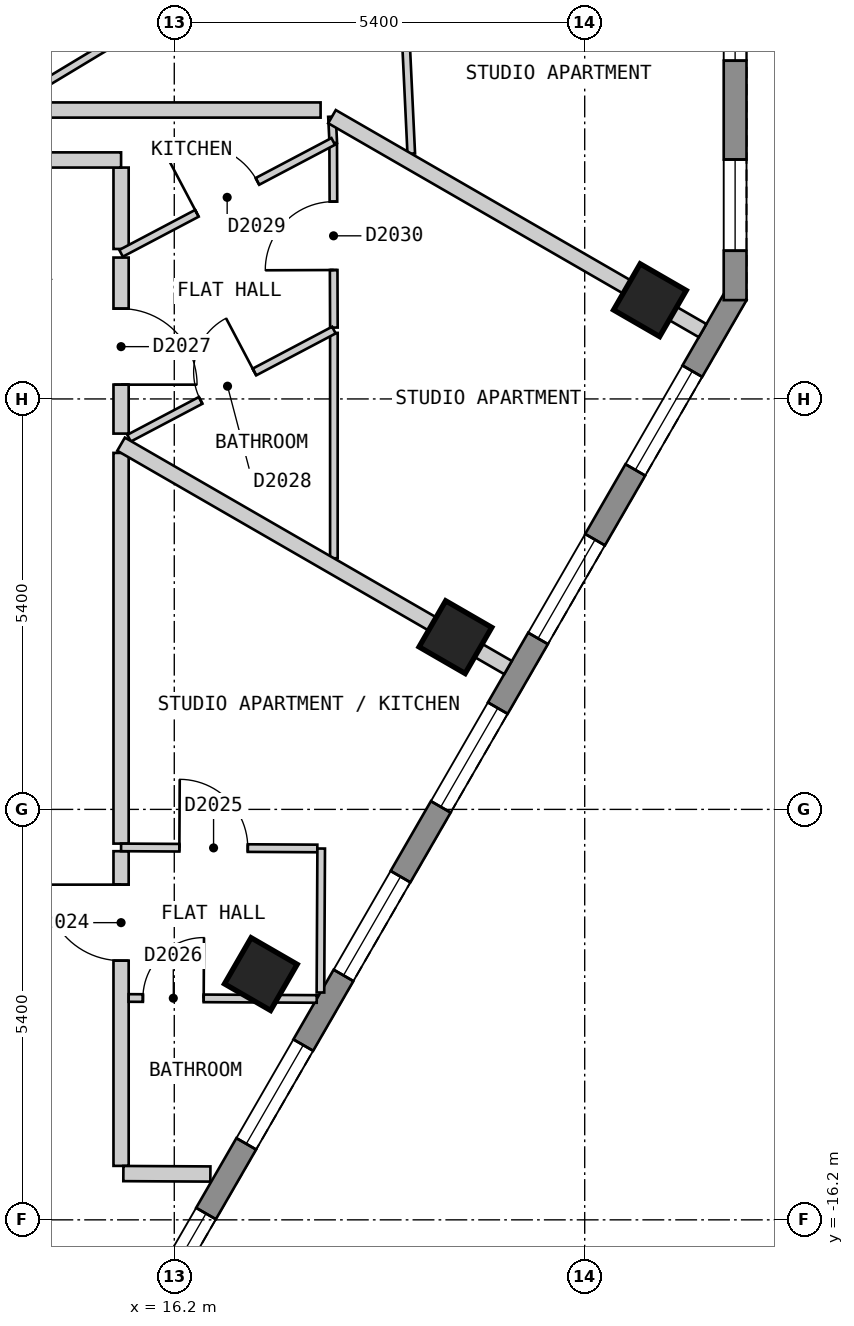
"""IFC4 building model, lengths in metres.
Left out: names, types, materials, properties, quantities, classifications, styles, units other than length and angle.
Written with IfcOpenShell. Run it as: python <this file> out.ifc"""

import sys

from ifc_helpers import new_model, si_unit, direction, frame, frame_2d, origin, origin_2d, place, context, subcontext, project, spatial, polyline, rectangle, outline, extrude, element, fill, save


model = new_model("IFC4")
c1 = context("Model", 3, precision=1e-05, world=origin(), true_north=direction((0.0, 1.0)))
c2 = subcontext(c1, "Body", "Model", "MODEL_VIEW")
j1 = project(units=[si_unit("LENGTHUNIT", "METRE"), si_unit("PLANEANGLEUNIT", "RADIAN")], contexts=[c1])
p1 = place(None, origin())
s1 = spatial("IfcSite", under=j1, at=p1, CompositionType="ELEMENT")
p2 = place(p1, origin())
s2 = spatial("IfcBuilding", under=s1, at=p2, CompositionType="ELEMENT")
p3 = place(p2, frame((0.0, 0.0, 238.8)))
s3 = spatial("IfcBuildingStorey", under=s2, at=p3, CompositionType="ELEMENT", Elevation=238.8)
for number, where, z_axis, x_axis in (
    (1, (17.339, -12.967, 0.0), (0.0, 0.0, 1.0), (0.5, 0.866, 0.0)),
    (2, (19.899, -8.534, 0.0), (0.0, 0.0, 1.0), (0.5, 0.866, 0.0)),
    (3, (22.458, -4.101, 0.0), (0.0, 0.0, 1.0), (0.5, 0.866, 0.0)),
):
    element("IfcColumn", number, at=place(p3, frame(where, z_axis=z_axis, x_axis=x_axis)), inside=s3, PredefinedType="COLUMN", context=c2, shape_type="SweptSolid", body=[
        extrude(rectangle(XDim=0.7, YDim=0.7, at=origin_2d()), origin(), (0.0, 0.0, 1.0), 3.0),
    ])
p4 = place(p3, frame((15.285, -18.425, 0.0), z_axis=(0.0, 0.0, 1.0), x_axis=(0.500012653391, 0.866018098222, 0.0)))
e4 = element("IfcWall", 4, at=p4, inside=s3, PredefinedType="SOLIDWALL", context=c2, shape_type="SweptSolid", body=[
    extrude(outline(polyline([(0.0, -0.15), (16.628, -0.15), (16.548, 0.15), (0.08, 0.15), (0.0, -0.15)])), origin(), (0.0, 0.0, 1.0), 2.7),
])
p5 = place(p4, frame((1.165, 0.0, 0.15)))
e5 = element("IfcOpeningElement", 5, at=p5, cuts=e4, PredefinedType="OPENING", context=c2, shape_type="SweptSolid", body=[
    extrude(rectangle(XDim=1.5, YDim=2.1, at=frame_2d((0.75, 1.05))), frame((0.0, 0.16, 0.0), z_axis=(0.0, -1.0, 0.0), x_axis=(1.0, 0.0, 0.0)), (0.0, 0.0, 1.0), 0.32),
])
p6 = place(p4, frame((3.724, 0.0, 0.15)))
e6 = element("IfcOpeningElement", 6, at=p6, cuts=e4, PredefinedType="OPENING", context=c2, shape_type="SweptSolid", body=[
    extrude(rectangle(XDim=1.5, YDim=2.1, at=frame_2d((0.75, 1.05))), frame((0.0, 0.16, 0.0), z_axis=(0.0, -1.0, 0.0), x_axis=(1.0, 0.0, 0.0)), (0.0, 0.0, 1.0), 0.32),
])
p7 = place(p4, frame((6.283, 0.0, 0.15)))
e7 = element("IfcOpeningElement", 7, at=p7, cuts=e4, PredefinedType="OPENING", context=c2, shape_type="SweptSolid", body=[
    extrude(rectangle(XDim=1.5, YDim=2.1, at=frame_2d((0.75, 1.05))), frame((0.0, 0.16, 0.0), z_axis=(0.0, -1.0, 0.0), x_axis=(1.0, 0.0, 0.0)), (0.0, 0.0, 1.0), 0.32),
])
p8 = place(p4, frame((8.843, 0.0, 0.15)))
e8 = element("IfcOpeningElement", 8, at=p8, cuts=e4, PredefinedType="OPENING", context=c2, shape_type="SweptSolid", body=[
    extrude(rectangle(XDim=1.5, YDim=2.1, at=frame_2d((0.75, 1.05))), frame((0.0, 0.16, 0.0), z_axis=(0.0, -1.0, 0.0), x_axis=(1.0, 0.0, 0.0)), (0.0, 0.0, 1.0), 0.32),
])
p9 = place(p4, frame((11.402, 0.0, 0.15)))
e9 = element("IfcOpeningElement", 9, at=p9, cuts=e4, PredefinedType="OPENING", context=c2, shape_type="SweptSolid", body=[
    extrude(rectangle(XDim=1.5, YDim=2.1, at=frame_2d((0.75, 1.05))), frame((0.0, 0.16, 0.0), z_axis=(0.0, -1.0, 0.0), x_axis=(1.0, 0.0, 0.0)), (0.0, 0.0, 1.0), 0.32),
])
p10 = place(p4, frame((13.962, 0.0, 0.15)))
e10 = element("IfcOpeningElement", 10, at=p10, cuts=e4, PredefinedType="OPENING", context=c2, shape_type="SweptSolid", body=[
    extrude(rectangle(XDim=1.5, YDim=2.1, at=frame_2d((0.75, 1.05))), frame((0.0, 0.16, 0.0), z_axis=(0.0, -1.0, 0.0), x_axis=(1.0, 0.0, 0.0)), (0.0, 0.0, 1.0), 0.32),
])
p11 = place(p3, frame((23.579, -4.1, 0.0), z_axis=(0.0, 0.0, 1.0), x_axis=(0.0, 1.0, 0.0)))
e11 = element("IfcWall", 11, at=p11, inside=s3, PredefinedType="SOLIDWALL", context=c2, shape_type="SweptSolid", body=[
    extrude(outline(polyline([(0.0, -0.15), (5.0, -0.15), (4.92, 0.15), (0.08, 0.15), (0.0, -0.15)])), origin(), (0.0, 0.0, 1.0), 2.7),
])
p12 = place(p11, frame((0.65, 0.0, 0.15)))
e12 = element("IfcOpeningElement", 12, at=p12, cuts=e11, PredefinedType="OPENING", context=c2, shape_type="SweptSolid", body=[
    extrude(rectangle(XDim=1.2, YDim=2.1, at=frame_2d((0.6, 1.05))), frame((0.0, 0.16, 0.0), z_axis=(0.0, -1.0, 0.0), x_axis=(1.0, 0.0, 0.0)), (0.0, 0.0, 1.0), 0.32),
])
p13 = place(p11, frame((3.15, 0.0, 0.15)))
e13 = element("IfcOpeningElement", 13, at=p13, cuts=e11, PredefinedType="OPENING", context=c2, shape_type="SweptSolid", body=[
    extrude(rectangle(XDim=1.2, YDim=2.1, at=frame_2d((0.6, 1.05))), frame((0.0, 0.16, 0.0), z_axis=(0.0, -1.0, 0.0), x_axis=(1.0, 0.0, 0.0)), (0.0, 0.0, 1.0), 0.32),
])
p14 = place(p3, frame((15.5, -2.356, 0.0), z_axis=(0.0, 0.0, 1.0), x_axis=(0.0, -1.0, 0.0)))
e14 = element("IfcWall", 14, at=p14, inside=s3, PredefinedType="PARTITIONING", context=c2, shape_type="SweptSolid", body=[
    extrude(rectangle(XDim=1.071, YDim=0.2, at=frame_2d((0.536, 0.0))), origin(), (0.0, 0.0, 1.0), 2.7),
])
p15 = place(p3, frame((15.5, -6.11, 0.0), z_axis=(0.0, 0.0, 1.0), x_axis=(0.0, -1.0, 0.0)))
e15 = element("IfcWall", 15, at=p15, inside=s3, PredefinedType="PARTITIONING", context=c2, shape_type="SweptSolid", body=[
    extrude(rectangle(XDim=5.14, YDim=0.2, at=frame_2d((2.57, 0.0))), origin(), (0.0, 0.0, 1.0), 2.7),
])
p16 = place(p3, frame((12.902, -2.256, 0.0), z_axis=(0.0, 0.0, 1.0), x_axis=(1.0, 0.0, 0.0)))
e16 = element("IfcWall", 16, at=p16, inside=s3, PredefinedType="PARTITIONING", context=c2, shape_type="SweptSolid", body=[
    extrude(rectangle(XDim=2.598, YDim=0.2, at=frame_2d((1.299, 0.0))), origin(), (0.0, 0.0, 1.0), 2.7),
])
p17 = place(p3, frame((15.5, -15.49, 0.0), z_axis=(0.0, 0.0, 1.0), x_axis=(0.0, 1.0, 0.0)))
e17 = element("IfcWall", 17, at=p17, inside=s3, PredefinedType="PARTITIONING", context=c2, shape_type="SweptSolid", body=[
    extrude(rectangle(XDim=4.14, YDim=0.2, at=frame_2d((2.07, 0.0))), origin(), (0.0, 0.0, 1.0), 2.7),
])
p18 = place(p17, frame((2.7, 0.0, 0.0)))
e18 = element("IfcOpeningElement", 18, at=p18, cuts=e17, PredefinedType="OPENING", context=c2, shape_type="SweptSolid", body=[
    extrude(rectangle(XDim=1.0, YDim=2.1, at=frame_2d((0.5, 1.05))), frame((0.0, 0.11, 0.0), z_axis=(0.0, -1.0, 0.0), x_axis=(1.0, 0.0, 0.0)), (0.0, 0.0, 1.0), 0.22),
])
p19 = place(p3, frame((15.5, -5.856, 0.0), z_axis=(0.0, 0.0, 1.0), x_axis=(0.0, 1.0, 0.0)))
e19 = element("IfcWall", 19, at=p19, inside=s3, PredefinedType="PARTITIONING", context=c2, shape_type="SweptSolid", body=[
    extrude(rectangle(XDim=2.316, YDim=0.2, at=frame_2d((1.158, 0.0))), origin(), (0.0, 0.0, 1.0), 2.7),
])
p20 = place(p19, frame((0.644, 0.0, 0.0)))
e20 = element("IfcOpeningElement", 20, at=p20, cuts=e19, PredefinedType="OPENING", context=c2, shape_type="SweptSolid", body=[
    extrude(rectangle(XDim=1.0, YDim=2.1, at=frame_2d((0.5, 1.05))), frame((0.0, 0.11, 0.0), z_axis=(0.0, -1.0, 0.0), x_axis=(1.0, 0.0, 0.0)), (0.0, 0.0, 1.0), 0.22),
])
p21 = place(p3, frame((15.5, -11.3, 0.0), z_axis=(0.0, 0.0, 1.0), x_axis=(0.999985476631, -0.005389482996, 0.0)))
e21 = element("IfcWall", 21, at=p21, inside=s3, PredefinedType="PARTITIONING", context=c2, shape_type="SweptSolid", body=[
    extrude(rectangle(XDim=2.582, YDim=0.1, at=frame_2d((1.291, 0.0))), origin(), (0.0, 0.0, 1.0), 2.7),
])
p22 = place(p21, frame((0.767, 0.0, 0.0)))
e22 = element("IfcOpeningElement", 22, at=p22, cuts=e21, PredefinedType="OPENING", context=c2, shape_type="SweptSolid", body=[
    extrude(rectangle(XDim=0.9, YDim=2.1, at=frame_2d((0.45, 1.05))), frame((0.0, 0.06, 0.0), z_axis=(0.0, -1.0, 0.0), x_axis=(1.0, 0.0, 0.0)), (0.0, 0.0, 1.0), 0.12),
])
p23 = place(p3, frame((15.6, -13.281, 0.0), z_axis=(0.0, 0.0, 1.0), x_axis=(0.999986321554, -0.005230363667, 0.0)))
e23 = element("IfcWall", 23, at=p23, inside=s3, PredefinedType="PARTITIONING", context=c2, shape_type="SweptSolid", body=[
    extrude(rectangle(XDim=2.474, YDim=0.1, at=frame_2d((1.237, 0.0))), origin(), (0.0, 0.0, 1.0), 2.7),
])
p24 = place(p23, frame((0.187, 0.0, 0.0)))
e24 = element("IfcOpeningElement", 24, at=p24, cuts=e23, PredefinedType="OPENING", context=c2, shape_type="SweptSolid", body=[
    extrude(rectangle(XDim=0.8, YDim=2.1, at=frame_2d((0.4, 1.05))), frame((0.0, 0.06, 0.0), z_axis=(0.0, -1.0, 0.0), x_axis=(1.0, 0.0, 0.0)), (0.0, 0.0, 1.0), 0.12),
])
p25 = place(p3, frame((18.275, -1.686, 0.0), z_axis=(0.0, 0.0, 1.0), x_axis=(0.049063646166, -0.998795654088, 0.0)))
e25 = element("IfcWall", 25, at=p25, inside=s3, PredefinedType="PARTITIONING", context=c2, shape_type="SweptSolid", body=[
    extrude(rectangle(XDim=0.348, YDim=0.1, at=frame_2d((0.174, 0.0))), origin(), (0.0, 0.0, 1.0), 2.7),
])
p26 = place(p3, frame((19.151, 1.343, 0.0), z_axis=(0.0, 0.0, 1.0), x_axis=(0.047509130714, -0.998870803707, 0.0)))
e26 = element("IfcWall", 26, at=p26, inside=s3, PredefinedType="PARTITIONING", context=c2, shape_type="SweptSolid", body=[
    extrude(rectangle(XDim=3.52, YDim=0.1, at=frame_2d((1.76, 0.0))), origin(), (0.0, 0.0, 1.0), 2.7),
])
p27 = place(p3, frame((18.291, -2.048, 0.0), z_axis=(0.0, 0.0, 1.0), x_axis=(0.003743776253, -0.999992992045, 0.0)))
e27 = element("IfcWall", 27, at=p27, inside=s3, PredefinedType="PARTITIONING", context=c2, shape_type="SweptSolid", body=[
    extrude(rectangle(XDim=2.413, YDim=0.1, at=frame_2d((1.207, 0.0))), origin(), (0.0, 0.0, 1.0), 2.7),
])
p28 = place(p27, frame((0.756, 0.0, 0.0)))
e28 = element("IfcOpeningElement", 28, at=p28, cuts=e27, PredefinedType="OPENING", context=c2, shape_type="SweptSolid", body=[
    extrude(rectangle(XDim=0.9, YDim=2.1, at=frame_2d((0.45, 1.05))), frame((0.0, 0.06, 0.0), z_axis=(0.0, -1.0, 0.0), x_axis=(1.0, 0.0, 0.0)), (0.0, 0.0, 1.0), 0.12),
])
p29 = place(p3, frame((18.123, -13.209, 0.0), z_axis=(0.0, 0.0, 1.0), x_axis=(0.005284793433, 0.999986035382, 0.0)))
e29 = element("IfcWall", 29, at=p29, inside=s3, PredefinedType="PARTITIONING", context=c2, shape_type="SweptSolid", body=[
    extrude(rectangle(XDim=1.894, YDim=0.1, at=frame_2d((0.947, 0.0))), origin(), (0.0, 0.0, 1.0), 2.7),
])
p30 = place(p3, frame((18.3, -7.496, 0.0), z_axis=(0.0, 0.0, 1.0), x_axis=(0.0, 1.0, 0.0)))
e30 = element("IfcWall", 30, at=p30, inside=s3, PredefinedType="PARTITIONING", context=c2, shape_type="SweptSolid", body=[
    extrude(rectangle(XDim=2.965, YDim=0.1, at=frame_2d((1.482, 0.0))), origin(), (0.0, 0.0, 1.0), 2.7),
])
p31 = place(p3, frame((15.5, -3.484, 0.0), z_axis=(0.0, 0.0, 1.0), x_axis=(0.884530210683, 0.466482911145, 0.0)))
e31 = element("IfcWall", 31, at=p31, inside=s3, PredefinedType="PARTITIONING", context=c2, shape_type="SweptSolid", body=[
    extrude(rectangle(XDim=3.155, YDim=0.1, at=frame_2d((1.578, 0.0))), origin(), (0.0, 0.0, 1.0), 2.7),
])
p32 = place(p31, frame((1.128, 0.0, 0.0)))
e32 = element("IfcOpeningElement", 32, at=p32, cuts=e31, PredefinedType="OPENING", context=c2, shape_type="SweptSolid", body=[
    extrude(rectangle(XDim=0.9, YDim=2.1, at=frame_2d((0.45, 1.05))), frame((0.0, 0.06, 0.0), z_axis=(0.0, -1.0, 0.0), x_axis=(1.0, 0.0, 0.0)), (0.0, 0.0, 1.0), 0.12),
])
p33 = place(p3, frame((15.605, -5.916, 0.0), z_axis=(0.0, 0.0, 1.0), x_axis=(0.884422415573, 0.466687251627, 0.0)))
e33 = element("IfcWall", 33, at=p33, inside=s3, PredefinedType="PARTITIONING", context=c2, shape_type="SweptSolid", body=[
    extrude(rectangle(XDim=3.047, YDim=0.1, at=frame_2d((1.524, 0.0))), origin(), (0.0, 0.0, 1.0), 2.7),
])
p34 = place(p33, frame((1.065, 0.0, 0.0)))
e34 = element("IfcOpeningElement", 34, at=p34, cuts=e33, PredefinedType="OPENING", context=c2, shape_type="SweptSolid", body=[
    extrude(rectangle(XDim=0.8, YDim=2.1, at=frame_2d((0.4, 1.05))), frame((0.0, 0.06, 0.0), z_axis=(0.0, -1.0, 0.0), x_axis=(1.0, 0.0, 0.0)), (0.0, 0.0, 1.0), 0.12),
])
p35 = place(p3, frame((14.081, -1.499, 0.0), z_axis=(0.0, 0.0, 1.0), x_axis=(0.85652273816, 0.516109289798, 0.0)))
e35 = element("IfcWall", 35, at=p35, inside=s3, PredefinedType="PARTITIONING", context=c2, shape_type="SweptSolid", body=[
    extrude(rectangle(XDim=5.537, YDim=0.1, at=frame_2d((2.769, 0.0))), origin(), (0.0, 0.0, 1.0), 2.7),
])
p36 = place(p35, frame((2.267, 0.0, 0.0)))
e36 = element("IfcOpeningElement", 36, at=p36, cuts=e35, PredefinedType="OPENING", context=c2, shape_type="SweptSolid", body=[
    extrude(rectangle(XDim=0.9, YDim=2.1, at=frame_2d((0.45, 1.05))), frame((0.0, 0.06, 0.0), z_axis=(0.0, -1.0, 0.0), x_axis=(1.0, 0.0, 0.0)), (0.0, 0.0, 1.0), 0.12),
])
p37 = place(p3, frame((15.53, -15.591, 0.0), z_axis=(0.0, 0.0, 1.0), x_axis=(0.999986907027, -0.005117203789, 0.0)))
e37 = element("IfcWall", 37, at=p37, inside=s3, PredefinedType="PARTITIONING", context=c2, shape_type="SweptSolid", body=[
    extrude(rectangle(XDim=1.145, YDim=0.2, at=frame_2d((0.573, 0.0))), origin(), (0.0, 0.0, 1.0), 2.7),
])
p38 = place(p3, frame((18.275, -1.686, 0.0), z_axis=(0.0, 0.0, 1.0), x_axis=(0.866041167766, -0.49997269499, 0.0)))
e38 = element("IfcWall", 38, at=p38, inside=s3, PredefinedType="PARTITIONING", context=c2, shape_type="SweptSolid", body=[
    extrude(rectangle(XDim=5.63, YDim=0.2, at=frame_2d((2.815, 0.0))), origin(), (0.0, 0.0, 1.0), 2.7),
])
p39 = place(p3, frame((15.5, -5.995, 0.0), z_axis=(0.0, 0.0, 1.0), x_axis=(0.866052111102, -0.499953738716, 0.0)))
e39 = element("IfcWall", 39, at=p39, inside=s3, PredefinedType="PARTITIONING", context=c2, shape_type="SweptSolid", body=[
    extrude(rectangle(XDim=5.878, YDim=0.2, at=frame_2d((2.939, 0.0))), origin(), (0.0, 0.0, 1.0), 2.7),
])
p40 = place(p3, frame((13.163, -1.599, 0.0), z_axis=(0.0, 0.0, 1.0), x_axis=(1.0, 0.0, 0.0)))
e40 = element("IfcWall", 40, at=p40, inside=s3, PredefinedType="PARTITIONING", context=c2, shape_type="SweptSolid", body=[
    extrude(rectangle(XDim=4.962, YDim=0.2, at=frame_2d((2.481, 0.0))), origin(), (0.0, 0.0, 1.0), 2.7),
])
p41 = place(p5, origin())
e41 = element("IfcWindow", 41, at=p41, inside=s3, PartitioningType="SINGLE_PANEL", PredefinedType="WINDOW", context=c2, shape_type="SweptSolid", body=[
    extrude(rectangle(XDim=1.5, YDim=2.1, at=frame_2d((0.75, 1.05))), frame((0.0, 0.03, 0.0), z_axis=(0.0, -1.0, 0.0), x_axis=(1.0, 0.0, 0.0)), (0.0, 0.0, 1.0), 0.06),
])
fill(e5, e41)
p42 = place(p6, origin())
e42 = element("IfcWindow", 42, at=p42, inside=s3, PartitioningType="SINGLE_PANEL", PredefinedType="WINDOW", context=c2, shape_type="SweptSolid", body=[
    extrude(rectangle(XDim=1.5, YDim=2.1, at=frame_2d((0.75, 1.05))), frame((0.0, 0.03, 0.0), z_axis=(0.0, -1.0, 0.0), x_axis=(1.0, 0.0, 0.0)), (0.0, 0.0, 1.0), 0.06),
])
fill(e6, e42)
p43 = place(p7, origin())
e43 = element("IfcWindow", 43, at=p43, inside=s3, PartitioningType="SINGLE_PANEL", PredefinedType="WINDOW", context=c2, shape_type="SweptSolid", body=[
    extrude(rectangle(XDim=1.5, YDim=2.1, at=frame_2d((0.75, 1.05))), frame((0.0, 0.03, 0.0), z_axis=(0.0, -1.0, 0.0), x_axis=(1.0, 0.0, 0.0)), (0.0, 0.0, 1.0), 0.06),
])
fill(e7, e43)
p44 = place(p8, origin())
e44 = element("IfcWindow", 44, at=p44, inside=s3, PartitioningType="SINGLE_PANEL", PredefinedType="WINDOW", context=c2, shape_type="SweptSolid", body=[
    extrude(rectangle(XDim=1.5, YDim=2.1, at=frame_2d((0.75, 1.05))), frame((0.0, 0.03, 0.0), z_axis=(0.0, -1.0, 0.0), x_axis=(1.0, 0.0, 0.0)), (0.0, 0.0, 1.0), 0.06),
])
fill(e8, e44)
p45 = place(p9, origin())
e45 = element("IfcWindow", 45, at=p45, inside=s3, PartitioningType="SINGLE_PANEL", PredefinedType="WINDOW", context=c2, shape_type="SweptSolid", body=[
    extrude(rectangle(XDim=1.5, YDim=2.1, at=frame_2d((0.75, 1.05))), frame((0.0, 0.03, 0.0), z_axis=(0.0, -1.0, 0.0), x_axis=(1.0, 0.0, 0.0)), (0.0, 0.0, 1.0), 0.06),
])
fill(e9, e45)
p46 = place(p10, origin())
e46 = element("IfcWindow", 46, at=p46, inside=s3, PartitioningType="SINGLE_PANEL", PredefinedType="WINDOW", context=c2, shape_type="SweptSolid", body=[
    extrude(rectangle(XDim=1.5, YDim=2.1, at=frame_2d((0.75, 1.05))), frame((0.0, 0.03, 0.0), z_axis=(0.0, -1.0, 0.0), x_axis=(1.0, 0.0, 0.0)), (0.0, 0.0, 1.0), 0.06),
])
fill(e10, e46)
p47 = place(p12, origin())
e47 = element("IfcWindow", 47, at=p47, inside=s3, PartitioningType="SINGLE_PANEL", PredefinedType="WINDOW", context=c2, shape_type="SweptSolid", body=[
    extrude(rectangle(XDim=1.2, YDim=2.1, at=frame_2d((0.6, 1.05))), frame((0.0, 0.03, 0.0), z_axis=(0.0, -1.0, 0.0), x_axis=(1.0, 0.0, 0.0)), (0.0, 0.0, 1.0), 0.06),
])
fill(e12, e47)
p48 = place(p13, origin())
e48 = element("IfcWindow", 48, at=p48, inside=s3, PartitioningType="SINGLE_PANEL", PredefinedType="WINDOW", context=c2, shape_type="SweptSolid", body=[
    extrude(rectangle(XDim=1.2, YDim=2.1, at=frame_2d((0.6, 1.05))), frame((0.0, 0.03, 0.0), z_axis=(0.0, -1.0, 0.0), x_axis=(1.0, 0.0, 0.0)), (0.0, 0.0, 1.0), 0.06),
])
fill(e13, e48)
p49 = place(p18, origin())
e49 = element("IfcDoor", 49, at=p49, inside=s3, OperationType="SINGLE_SWING_RIGHT", PredefinedType="DOOR", context=c2, shape_type="SweptSolid", body=[
    extrude(rectangle(XDim=1.0, YDim=2.1, at=frame_2d((0.5, 1.05))), frame((0.0, 0.025, 0.0), z_axis=(0.0, -1.0, 0.0), x_axis=(1.0, 0.0, 0.0)), (0.0, 0.0, 1.0), 0.05),
])
fill(e18, e49)
p50 = place(p22, origin())
e50 = element("IfcDoor", 50, at=p50, inside=s3, OperationType="SINGLE_SWING_LEFT", PredefinedType="DOOR", context=c2, shape_type="SweptSolid", body=[
    extrude(rectangle(XDim=0.9, YDim=2.1, at=frame_2d((0.45, 1.05))), frame((0.0, 0.025, 0.0), z_axis=(0.0, -1.0, 0.0), x_axis=(1.0, 0.0, 0.0)), (0.0, 0.0, 1.0), 0.05),
])
fill(e22, e50)
p51 = place(p24, origin())
e51 = element("IfcDoor", 51, at=p51, inside=s3, OperationType="SINGLE_SWING_RIGHT", PredefinedType="DOOR", context=c2, shape_type="SweptSolid", body=[
    extrude(rectangle(XDim=0.8, YDim=2.1, at=frame_2d((0.4, 1.05))), frame((0.0, 0.025, 0.0), z_axis=(0.0, -1.0, 0.0), x_axis=(1.0, 0.0, 0.0)), (0.0, 0.0, 1.0), 0.05),
])
fill(e24, e51)
p52 = place(p20, origin())
e52 = element("IfcDoor", 52, at=p52, inside=s3, OperationType="SINGLE_SWING_LEFT", PredefinedType="DOOR", context=c2, shape_type="SweptSolid", body=[
    extrude(rectangle(XDim=1.0, YDim=2.1, at=frame_2d((0.5, 1.05))), frame((0.0, 0.025, 0.0), z_axis=(0.0, -1.0, 0.0), x_axis=(1.0, 0.0, 0.0)), (0.0, 0.0, 1.0), 0.05),
])
fill(e20, e52)
p53 = place(p34, origin())
e53 = element("IfcDoor", 53, at=p53, inside=s3, OperationType="SINGLE_SWING_RIGHT", PredefinedType="DOOR", context=c2, shape_type="SweptSolid", body=[
    extrude(rectangle(XDim=0.8, YDim=2.1, at=frame_2d((0.4, 1.05))), frame((0.0, 0.025, 0.0), z_axis=(0.0, -1.0, 0.0), x_axis=(1.0, 0.0, 0.0)), (0.0, 0.0, 1.0), 0.05),
])
fill(e34, e53)
p54 = place(p32, origin())
e54 = element("IfcDoor", 54, at=p54, inside=s3, OperationType="SINGLE_SWING_LEFT", PredefinedType="DOOR", context=c2, shape_type="SweptSolid", body=[
    extrude(rectangle(XDim=0.9, YDim=2.1, at=frame_2d((0.45, 1.05))), frame((0.0, 0.025, 0.0), z_axis=(0.0, -1.0, 0.0), x_axis=(1.0, 0.0, 0.0)), (0.0, 0.0, 1.0), 0.05),
])
fill(e32, e54)
p55 = place(p28, origin())
e55 = element("IfcDoor", 55, at=p55, inside=s3, OperationType="SINGLE_SWING_RIGHT", PredefinedType="DOOR", context=c2, shape_type="SweptSolid", body=[
    extrude(rectangle(XDim=0.9, YDim=2.1, at=frame_2d((0.45, 1.05))), frame((0.0, 0.025, 0.0), z_axis=(0.0, -1.0, 0.0), x_axis=(1.0, 0.0, 0.0)), (0.0, 0.0, 1.0), 0.05),
])
fill(e28, e55)
save(model, sys.argv[1])
